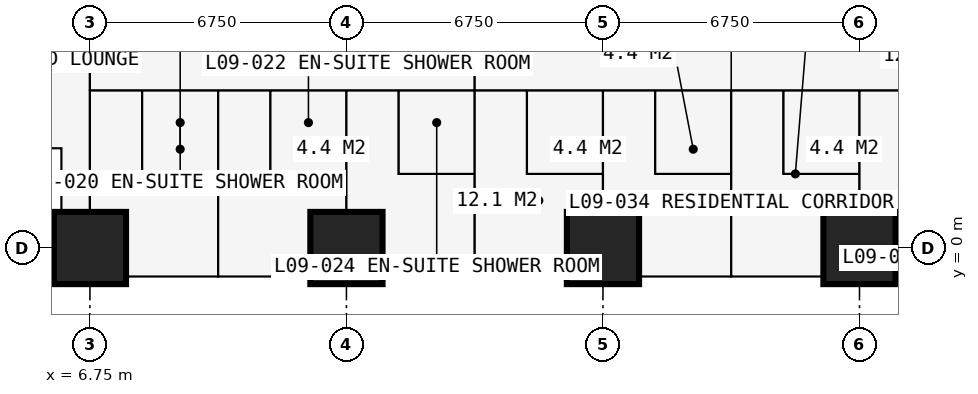
"""IFC4 building model, lengths in metres.
Left out: names, types, materials, properties, quantities, classifications, styles, units other than length and angle.
Written with IfcOpenShell. Run it as: python <this file> out.ifc"""

import sys

from ifc_helpers import new_model, si_unit, direction, frame, frame_2d, origin, origin_2d, place, context, subcontext, project, spatial, rectangle, extrude, element, fill, save


model = new_model("IFC4")
c1 = context("Model", 3, precision=1e-05, world=origin(), true_north=direction((0.0, 1.0)))
c2 = subcontext(c1, "Body", "Model", "MODEL_VIEW")
j1 = project(units=[si_unit("LENGTHUNIT", "METRE"), si_unit("PLANEANGLEUNIT", "RADIAN")], contexts=[c1])
p1 = place(None, origin())
s1 = spatial("IfcSite", under=j1, at=p1, CompositionType="ELEMENT")
p2 = place(p1, origin())
s2 = spatial("IfcBuilding", under=s1, at=p2, CompositionType="ELEMENT")
p3 = place(p2, frame((0.0, 0.0, 36.0)))
s3 = spatial("IfcBuildingStorey", under=s2, at=p3, CompositionType="ELEMENT", Elevation=36.0)
for number, where, z_axis, x_axis in (
    (1, (6.75, 0.0, 0.0), (0.0, 0.0, 1.0), (1.0, 0.0, 0.0)),
    (2, (13.5, 0.0, 0.0), (0.0, 0.0, 1.0), (1.0, 0.0, 0.0)),
    (3, (20.25, 0.0, 0.0), (0.0, 0.0, 1.0), (1.0, 0.0, 0.0)),
    (4, (27.0, 0.0, 0.0), (0.0, 0.0, 1.0), (1.0, 0.0, 0.0)),
):
    element("IfcColumn", number, at=place(p3, frame(where, z_axis=z_axis, x_axis=x_axis)), inside=s3, PredefinedType="COLUMN", context=c2, shape_type="SweptSolid", body=[
        extrude(rectangle(XDim=1.9, YDim=1.9, at=origin_2d()), origin(), (0.0, 0.0, 1.0), 3.6),
    ])
p4 = place(p3, frame((2.625, 2.625, 0.0), z_axis=(0.0, 0.0, 1.0), x_axis=(1.0, 0.0, 0.0)))
e5 = element("IfcWall", 5, at=p4, inside=s3, PredefinedType="SOLIDWALL", context=c2, shape_type="SweptSolid", body=[
    extrude(rectangle(XDim=3.375, YDim=0.3, at=frame_2d((1.688, 0.0))), origin(), (0.0, 0.0, 1.0), 3.375),
])
p5 = place(p4, frame((0.788, 0.0, 0.6)))
e6 = element("IfcOpeningElement", 6, at=p5, cuts=e5, PredefinedType="OPENING", context=c2, shape_type="SweptSolid", body=[
    extrude(rectangle(XDim=1.8, YDim=2.1, at=frame_2d((0.9, 1.05))), frame((0.0, 0.16, 0.0), z_axis=(0.0, -1.0, 0.0), x_axis=(1.0, 0.0, 0.0)), (0.0, 0.0, 1.0), 0.32),
])
p6 = place(p3, frame((6.0, 2.625, 0.0), z_axis=(0.0, 0.0, 1.0), x_axis=(0.0, -1.0, 0.0)))
e7 = element("IfcWall", 7, at=p6, inside=s3, PredefinedType="SOLIDWALL", context=c2, shape_type="SweptSolid", body=[
    extrude(rectangle(XDim=3.375, YDim=0.3, at=frame_2d((1.688, 0.0))), origin(), (0.0, 0.0, 1.0), 3.375),
])
p7 = place(p6, frame((0.317, 0.0, 0.9)))
e8 = element("IfcOpeningElement", 8, at=p7, cuts=e7, PredefinedType="OPENING", context=c2, shape_type="SweptSolid", body=[
    extrude(rectangle(XDim=1.2, YDim=1.8, at=frame_2d((0.6, 0.9))), frame((0.0, 0.16, 0.0), z_axis=(0.0, -1.0, 0.0), x_axis=(1.0, 0.0, 0.0)), (0.0, 0.0, 1.0), 0.32),
])
p8 = place(p3, frame((27.0, -0.75, 0.0), z_axis=(0.0, 0.0, 1.0), x_axis=(-1.0, 0.0, 0.0)))
e9 = element("IfcWall", 9, at=p8, inside=s3, PredefinedType="SOLIDWALL", context=c2, shape_type="SweptSolid", body=[
    extrude(rectangle(XDim=6.75, YDim=0.15, at=frame_2d((3.375, 0.0))), origin(), (0.0, 0.0, 1.0), 3.375),
])
p9 = place(p8, frame((0.996, 0.0, 0.0)))
e10 = element("IfcOpeningElement", 10, at=p9, cuts=e9, PredefinedType="OPENING", context=c2, shape_type="SweptSolid", body=[
    extrude(rectangle(XDim=1.0, YDim=2.2, at=frame_2d((0.5, 1.1))), frame((0.0, 0.085, 0.0), z_axis=(0.0, -1.0, 0.0), x_axis=(1.0, 0.0, 0.0)), (0.0, 0.0, 1.0), 0.17),
])
p10 = place(p8, frame((2.042, 0.0, 0.9)))
e11 = element("IfcOpeningElement", 11, at=p10, cuts=e9, PredefinedType="OPENING", context=c2, shape_type="SweptSolid", body=[
    extrude(rectangle(XDim=1.2, YDim=1.8, at=frame_2d((0.6, 0.9))), frame((0.0, 0.085, 0.0), z_axis=(0.0, -1.0, 0.0), x_axis=(1.0, 0.0, 0.0)), (0.0, 0.0, 1.0), 0.17),
])
p11 = place(p8, frame((4.754, 0.0, 0.0)))
e12 = element("IfcOpeningElement", 12, at=p11, cuts=e9, PredefinedType="OPENING", context=c2, shape_type="SweptSolid", body=[
    extrude(rectangle(XDim=1.0, YDim=2.2, at=frame_2d((0.5, 1.1))), frame((0.0, 0.085, 0.0), z_axis=(0.0, -1.0, 0.0), x_axis=(1.0, 0.0, 0.0)), (0.0, 0.0, 1.0), 0.17),
])
p12 = place(p8, frame((3.508, 0.0, 0.9)))
e13 = element("IfcOpeningElement", 13, at=p12, cuts=e9, PredefinedType="OPENING", context=c2, shape_type="SweptSolid", body=[
    extrude(rectangle(XDim=1.2, YDim=1.8, at=frame_2d((0.6, 0.9))), frame((0.0, 0.085, 0.0), z_axis=(0.0, -1.0, 0.0), x_axis=(1.0, 0.0, 0.0)), (0.0, 0.0, 1.0), 0.17),
])
p13 = place(p3, frame((23.625, -0.85, 0.0), z_axis=(0.0, 0.0, 1.0), x_axis=(0.0, -1.0, 0.0)))
e14 = element("IfcWall", 14, at=p13, inside=s3, PredefinedType="USERDEFINED", context=c2, shape_type="SweptSolid", body=[
    extrude(rectangle(XDim=2.2, YDim=1.0, at=frame_2d((1.1, 0.0))), origin(), (0.0, 0.0, 1.0), 0.9),
])
p14 = place(p3, frame((6.75, -0.734, 0.0), z_axis=(0.0, 0.0, 1.0), x_axis=(0.0, 1.0, 0.0)))
e15 = element("IfcWall", 15, at=p14, inside=s3, PredefinedType="PARTITIONING", context=c2, shape_type="SweptSolid", body=[
    extrude(rectangle(XDim=10.859, YDim=0.15, at=frame_2d((5.429, 0.0))), origin(), (0.0, 0.0, 1.0), 2.877),
])
p15 = place(p3, frame((6.75, 4.15, 0.0), z_axis=(0.0, 0.0, 1.0), x_axis=(1.0, 0.0, 0.0)))
e16 = element("IfcWall", 16, at=p15, inside=s3, PredefinedType="PARTITIONING", context=c2, shape_type="SweptSolid", body=[
    extrude(rectangle(XDim=23.625, YDim=0.1, at=frame_2d((11.812, 0.0))), origin(), (0.0, 0.0, 1.0), 3.375),
])
p16 = place(p15, frame((0.2, 0.0, 0.0)))
e17 = element("IfcOpeningElement", 17, at=p16, cuts=e16, PredefinedType="OPENING", context=c2, shape_type="SweptSolid", body=[
    extrude(rectangle(XDim=0.95, YDim=2.2, at=frame_2d((0.475, 1.1))), frame((0.0, 0.06, 0.0), z_axis=(0.0, -1.0, 0.0), x_axis=(1.0, 0.0, 0.0)), (0.0, 0.0, 1.0), 0.12),
])
p17 = place(p15, frame((3.625, 0.0, 0.0)))
e18 = element("IfcOpeningElement", 18, at=p17, cuts=e16, PredefinedType="OPENING", context=c2, shape_type="SweptSolid", body=[
    extrude(rectangle(XDim=0.95, YDim=2.2, at=frame_2d((0.475, 1.1))), frame((0.0, 0.06, 0.0), z_axis=(0.0, -1.0, 0.0), x_axis=(1.0, 0.0, 0.0)), (0.0, 0.0, 1.0), 0.12),
])
p18 = place(p15, frame((7.0, 0.0, 0.0)))
e19 = element("IfcOpeningElement", 19, at=p18, cuts=e16, PredefinedType="OPENING", context=c2, shape_type="SweptSolid", body=[
    extrude(rectangle(XDim=0.95, YDim=2.2, at=frame_2d((0.475, 1.1))), frame((0.0, 0.06, 0.0), z_axis=(0.0, -1.0, 0.0), x_axis=(1.0, 0.0, 0.0)), (0.0, 0.0, 1.0), 0.12),
])
p19 = place(p15, frame((10.325, 0.0, 0.0)))
e20 = element("IfcOpeningElement", 20, at=p19, cuts=e16, PredefinedType="OPENING", context=c2, shape_type="SweptSolid", body=[
    extrude(rectangle(XDim=0.95, YDim=2.2, at=frame_2d((0.475, 1.1))), frame((0.0, 0.06, 0.0), z_axis=(0.0, -1.0, 0.0), x_axis=(1.0, 0.0, 0.0)), (0.0, 0.0, 1.0), 0.12),
])
p20 = place(p15, frame((13.75, 0.0, 0.0)))
e21 = element("IfcOpeningElement", 21, at=p20, cuts=e16, PredefinedType="OPENING", context=c2, shape_type="SweptSolid", body=[
    extrude(rectangle(XDim=0.95, YDim=2.2, at=frame_2d((0.475, 1.1))), frame((0.0, 0.06, 0.0), z_axis=(0.0, -1.0, 0.0), x_axis=(1.0, 0.0, 0.0)), (0.0, 0.0, 1.0), 0.12),
])
p21 = place(p15, frame((17.125, 0.0, 0.0)))
e22 = element("IfcOpeningElement", 22, at=p21, cuts=e16, PredefinedType="OPENING", context=c2, shape_type="SweptSolid", body=[
    extrude(rectangle(XDim=0.95, YDim=2.2, at=frame_2d((0.475, 1.1))), frame((0.0, 0.06, 0.0), z_axis=(0.0, -1.0, 0.0), x_axis=(1.0, 0.0, 0.0)), (0.0, 0.0, 1.0), 0.12),
])
p22 = place(p15, frame((20.5, 0.0, 0.0)))
e23 = element("IfcOpeningElement", 23, at=p22, cuts=e16, PredefinedType="OPENING", context=c2, shape_type="SweptSolid", body=[
    extrude(rectangle(XDim=0.95, YDim=2.2, at=frame_2d((0.475, 1.1))), frame((0.0, 0.06, 0.0), z_axis=(0.0, -1.0, 0.0), x_axis=(1.0, 0.0, 0.0)), (0.0, 0.0, 1.0), 0.12),
])
p23 = place(p3, frame((8.125, 1.95, 0.0), z_axis=(0.0, 0.0, 1.0), x_axis=(0.0, 1.0, 0.0)))
e24 = element("IfcWall", 24, at=p23, inside=s3, PredefinedType="PARTITIONING", context=c2, shape_type="SweptSolid", body=[
    extrude(rectangle(XDim=2.2, YDim=0.1, at=frame_2d((1.1, 0.0))), origin(), (0.0, 0.0, 1.0), 3.375),
])
p24 = place(p23, frame((0.65, 0.0, 0.0)))
e25 = element("IfcOpeningElement", 25, at=p24, cuts=e24, PredefinedType="OPENING", context=c2, shape_type="SweptSolid", body=[
    extrude(rectangle(XDim=0.9, YDim=2.2, at=frame_2d((0.45, 1.1))), frame((0.0, 0.06, 0.0), z_axis=(0.0, -1.0, 0.0), x_axis=(1.0, 0.0, 0.0)), (0.0, 0.0, 1.0), 0.12),
])
p25 = place(p3, frame((8.125, 1.95, 0.0), z_axis=(0.0, 0.0, 1.0), x_axis=(1.0, 0.0, 0.0)))
e26 = element("IfcWall", 26, at=p25, inside=s3, PredefinedType="PARTITIONING", context=c2, shape_type="SweptSolid", body=[
    extrude(rectangle(XDim=2.0, YDim=0.1, at=frame_2d((1.0, 0.0))), origin(), (0.0, 0.0, 1.0), 3.375),
])
p26 = place(p3, frame((10.125, -0.734, 0.0), z_axis=(0.0, 0.0, 1.0), x_axis=(0.0, 1.0, 0.0)))
e27 = element("IfcWall", 27, at=p26, inside=s3, PredefinedType="PARTITIONING", context=c2, shape_type="SweptSolid", body=[
    extrude(rectangle(XDim=4.884, YDim=0.175, at=frame_2d((2.442, 0.0))), origin(), (0.0, 0.0, 1.0), 3.375),
])
p27 = place(p3, frame((11.5, 1.95, 0.0), z_axis=(0.0, 0.0, 1.0), x_axis=(0.0, 1.0, 0.0)))
e28 = element("IfcWall", 28, at=p27, inside=s3, PredefinedType="PARTITIONING", context=c2, shape_type="SweptSolid", body=[
    extrude(rectangle(XDim=2.2, YDim=0.1, at=frame_2d((1.1, 0.0))), origin(), (0.0, 0.0, 1.0), 3.375),
])
p28 = place(p27, frame((0.65, 0.0, 0.0)))
e29 = element("IfcOpeningElement", 29, at=p28, cuts=e28, PredefinedType="OPENING", context=c2, shape_type="SweptSolid", body=[
    extrude(rectangle(XDim=0.9, YDim=2.2, at=frame_2d((0.45, 1.1))), frame((0.0, 0.06, 0.0), z_axis=(0.0, -1.0, 0.0), x_axis=(1.0, 0.0, 0.0)), (0.0, 0.0, 1.0), 0.12),
])
p29 = place(p3, frame((11.5, 1.95, 0.0), z_axis=(0.0, 0.0, 1.0), x_axis=(1.0, 0.0, 0.0)))
e30 = element("IfcWall", 30, at=p29, inside=s3, PredefinedType="PARTITIONING", context=c2, shape_type="SweptSolid", body=[
    extrude(rectangle(XDim=2.0, YDim=0.1, at=frame_2d((1.0, 0.0))), origin(), (0.0, 0.0, 1.0), 3.375),
])
p30 = place(p3, frame((13.5, -0.734, 0.0), z_axis=(0.0, 0.0, 1.0), x_axis=(0.0, 1.0, 0.0)))
e31 = element("IfcWall", 31, at=p30, inside=s3, PredefinedType="PARTITIONING", context=c2, shape_type="SweptSolid", body=[
    extrude(rectangle(XDim=4.884, YDim=0.175, at=frame_2d((2.442, 0.0))), origin(), (0.0, 0.0, 1.0), 2.61),
])
p31 = place(p3, frame((14.875, 1.95, 0.0), z_axis=(0.0, 0.0, 1.0), x_axis=(0.0, 1.0, 0.0)))
e32 = element("IfcWall", 32, at=p31, inside=s3, PredefinedType="PARTITIONING", context=c2, shape_type="SweptSolid", body=[
    extrude(rectangle(XDim=2.2, YDim=0.1, at=frame_2d((1.1, 0.0))), origin(), (0.0, 0.0, 1.0), 3.375),
])
p32 = place(p31, frame((0.65, 0.0, 0.0)))
e33 = element("IfcOpeningElement", 33, at=p32, cuts=e32, PredefinedType="OPENING", context=c2, shape_type="SweptSolid", body=[
    extrude(rectangle(XDim=0.9, YDim=2.2, at=frame_2d((0.45, 1.1))), frame((0.0, 0.06, 0.0), z_axis=(0.0, -1.0, 0.0), x_axis=(1.0, 0.0, 0.0)), (0.0, 0.0, 1.0), 0.12),
])
p33 = place(p3, frame((14.875, 1.95, 0.0), z_axis=(0.0, 0.0, 1.0), x_axis=(1.0, 0.0, 0.0)))
e34 = element("IfcWall", 34, at=p33, inside=s3, PredefinedType="PARTITIONING", context=c2, shape_type="SweptSolid", body=[
    extrude(rectangle(XDim=2.0, YDim=0.1, at=frame_2d((1.0, 0.0))), origin(), (0.0, 0.0, 1.0), 3.375),
])
p34 = place(p3, frame((16.875, -0.734, 0.0), z_axis=(0.0, 0.0, 1.0), x_axis=(0.0, 1.0, 0.0)))
e35 = element("IfcWall", 35, at=p34, inside=s3, PredefinedType="PARTITIONING", context=c2, shape_type="SweptSolid", body=[
    extrude(rectangle(XDim=12.034, YDim=0.15, at=frame_2d((6.017, 0.0))), origin(), (0.0, 0.0, 1.0), 3.375),
])
p35 = place(p3, frame((18.25, 1.95, 0.0), z_axis=(0.0, 0.0, 1.0), x_axis=(0.0, 1.0, 0.0)))
e36 = element("IfcWall", 36, at=p35, inside=s3, PredefinedType="PARTITIONING", context=c2, shape_type="SweptSolid", body=[
    extrude(rectangle(XDim=2.2, YDim=0.1, at=frame_2d((1.1, 0.0))), origin(), (0.0, 0.0, 1.0), 3.375),
])
p36 = place(p35, frame((0.65, 0.0, 0.0)))
e37 = element("IfcOpeningElement", 37, at=p36, cuts=e36, PredefinedType="OPENING", context=c2, shape_type="SweptSolid", body=[
    extrude(rectangle(XDim=0.9, YDim=2.2, at=frame_2d((0.45, 1.1))), frame((0.0, 0.06, 0.0), z_axis=(0.0, -1.0, 0.0), x_axis=(1.0, 0.0, 0.0)), (0.0, 0.0, 1.0), 0.12),
])
p37 = place(p3, frame((18.25, 1.95, 0.0), z_axis=(0.0, 0.0, 1.0), x_axis=(1.0, 0.0, 0.0)))
e38 = element("IfcWall", 38, at=p37, inside=s3, PredefinedType="PARTITIONING", context=c2, shape_type="SweptSolid", body=[
    extrude(rectangle(XDim=2.0, YDim=0.1, at=frame_2d((1.0, 0.0))), origin(), (0.0, 0.0, 1.0), 3.375),
])
p38 = place(p3, frame((20.25, -0.734, 0.0), z_axis=(0.0, 0.0, 1.0), x_axis=(0.0, 1.0, 0.0)))
e39 = element("IfcWall", 39, at=p38, inside=s3, PredefinedType="PARTITIONING", context=c2, shape_type="SweptSolid", body=[
    extrude(rectangle(XDim=4.884, YDim=0.175, at=frame_2d((2.442, 0.0))), origin(), (0.0, 0.0, 1.0), 2.61),
])
p39 = place(p3, frame((21.625, 1.95, 0.0), z_axis=(0.0, 0.0, 1.0), x_axis=(0.0, 1.0, 0.0)))
e40 = element("IfcWall", 40, at=p39, inside=s3, PredefinedType="PARTITIONING", context=c2, shape_type="SweptSolid", body=[
    extrude(rectangle(XDim=2.2, YDim=0.1, at=frame_2d((1.1, 0.0))), origin(), (0.0, 0.0, 1.0), 3.375),
])
p40 = place(p39, frame((0.65, 0.0, 0.0)))
e41 = element("IfcOpeningElement", 41, at=p40, cuts=e40, PredefinedType="OPENING", context=c2, shape_type="SweptSolid", body=[
    extrude(rectangle(XDim=0.9, YDim=2.2, at=frame_2d((0.45, 1.1))), frame((0.0, 0.06, 0.0), z_axis=(0.0, -1.0, 0.0), x_axis=(1.0, 0.0, 0.0)), (0.0, 0.0, 1.0), 0.12),
])
p41 = place(p3, frame((21.625, 1.95, 0.0), z_axis=(0.0, 0.0, 1.0), x_axis=(1.0, 0.0, 0.0)))
e42 = element("IfcWall", 42, at=p41, inside=s3, PredefinedType="PARTITIONING", context=c2, shape_type="SweptSolid", body=[
    extrude(rectangle(XDim=2.0, YDim=0.1, at=frame_2d((1.0, 0.0))), origin(), (0.0, 0.0, 1.0), 3.375),
])
p42 = place(p3, frame((23.625, -0.734, 0.0), z_axis=(0.0, 0.0, 1.0), x_axis=(0.0, 1.0, 0.0)))
e43 = element("IfcWall", 43, at=p42, inside=s3, PredefinedType="PARTITIONING", context=c2, shape_type="SweptSolid", body=[
    extrude(rectangle(XDim=4.884, YDim=0.175, at=frame_2d((2.442, 0.0))), origin(), (0.0, 0.0, 1.0), 3.375),
])
p43 = place(p3, frame((25.0, 1.95, 0.0), z_axis=(0.0, 0.0, 1.0), x_axis=(0.0, 1.0, 0.0)))
e44 = element("IfcWall", 44, at=p43, inside=s3, PredefinedType="PARTITIONING", context=c2, shape_type="SweptSolid", body=[
    extrude(rectangle(XDim=2.2, YDim=0.1, at=frame_2d((1.1, 0.0))), origin(), (0.0, 0.0, 1.0), 3.375),
])
p44 = place(p43, frame((0.65, 0.0, 0.0)))
e45 = element("IfcOpeningElement", 45, at=p44, cuts=e44, PredefinedType="OPENING", context=c2, shape_type="SweptSolid", body=[
    extrude(rectangle(XDim=0.9, YDim=2.2, at=frame_2d((0.45, 1.1))), frame((0.0, 0.06, 0.0), z_axis=(0.0, -1.0, 0.0), x_axis=(1.0, 0.0, 0.0)), (0.0, 0.0, 1.0), 0.12),
])
p45 = place(p3, frame((25.0, 1.95, 0.0), z_axis=(0.0, 0.0, 1.0), x_axis=(1.0, 0.0, 0.0)))
e46 = element("IfcWall", 46, at=p45, inside=s3, PredefinedType="PARTITIONING", context=c2, shape_type="SweptSolid", body=[
    extrude(rectangle(XDim=2.0, YDim=0.1, at=frame_2d((1.0, 0.0))), origin(), (0.0, 0.0, 1.0), 3.375),
])
p46 = place(p3, frame((27.0, -0.734, 0.0), z_axis=(0.0, 0.0, 1.0), x_axis=(0.0, 1.0, 0.0)))
e47 = element("IfcWall", 47, at=p46, inside=s3, PredefinedType="PARTITIONING", context=c2, shape_type="SweptSolid", body=[
    extrude(rectangle(XDim=4.884, YDim=0.175, at=frame_2d((2.442, 0.0))), origin(), (0.0, 0.0, 1.0), 2.877),
])
p47 = place(p7, origin())
e48 = element("IfcWindow", 48, at=p47, inside=s3, PartitioningType="SINGLE_PANEL", PredefinedType="WINDOW", context=c2, shape_type="SweptSolid", body=[
    extrude(rectangle(XDim=1.2, YDim=1.8, at=frame_2d((0.6, 0.9))), frame((0.0, 0.03, 0.0), z_axis=(0.0, -1.0, 0.0), x_axis=(1.0, 0.0, 0.0)), (0.0, 0.0, 1.0), 0.06),
])
fill(e8, e48)
p48 = place(p9, origin())
e49 = element("IfcDoor", 49, at=p48, inside=s3, OperationType="SINGLE_SWING_LEFT", PredefinedType="DOOR", context=c2, shape_type="SweptSolid", body=[
    extrude(rectangle(XDim=1.0, YDim=2.2, at=frame_2d((0.5, 1.1))), frame((0.0, 0.025, 0.0), z_axis=(0.0, -1.0, 0.0), x_axis=(1.0, 0.0, 0.0)), (0.0, 0.0, 1.0), 0.05),
])
fill(e10, e49)
p49 = place(p10, origin())
e50 = element("IfcWindow", 50, at=p49, inside=s3, PartitioningType="SINGLE_PANEL", PredefinedType="WINDOW", context=c2, shape_type="SweptSolid", body=[
    extrude(rectangle(XDim=1.2, YDim=1.8, at=frame_2d((0.6, 0.9))), frame((0.0, 0.03, 0.0), z_axis=(0.0, -1.0, 0.0), x_axis=(1.0, 0.0, 0.0)), (0.0, 0.0, 1.0), 0.06),
])
fill(e11, e50)
p50 = place(p11, origin())
e51 = element("IfcDoor", 51, at=p50, inside=s3, OperationType="SINGLE_SWING_RIGHT", PredefinedType="DOOR", context=c2, shape_type="SweptSolid", body=[
    extrude(rectangle(XDim=1.0, YDim=2.2, at=frame_2d((0.5, 1.1))), frame((0.0, 0.025, 0.0), z_axis=(0.0, -1.0, 0.0), x_axis=(1.0, 0.0, 0.0)), (0.0, 0.0, 1.0), 0.05),
])
fill(e12, e51)
p51 = place(p12, origin())
e52 = element("IfcWindow", 52, at=p51, inside=s3, PartitioningType="SINGLE_PANEL", PredefinedType="WINDOW", context=c2, shape_type="SweptSolid", body=[
    extrude(rectangle(XDim=1.2, YDim=1.8, at=frame_2d((0.6, 0.9))), frame((0.0, 0.03, 0.0), z_axis=(0.0, -1.0, 0.0), x_axis=(1.0, 0.0, 0.0)), (0.0, 0.0, 1.0), 0.06),
])
fill(e13, e52)
p52 = place(p16, origin())
e53 = element("IfcDoor", 53, at=p52, inside=s3, OperationType="SINGLE_SWING_LEFT", PredefinedType="DOOR", context=c2, shape_type="SweptSolid", body=[
    extrude(rectangle(XDim=0.95, YDim=2.2, at=frame_2d((0.475, 1.1))), frame((0.0, 0.025, 0.0), z_axis=(0.0, -1.0, 0.0), x_axis=(1.0, 0.0, 0.0)), (0.0, 0.0, 1.0), 0.05),
])
fill(e17, e53)
p53 = place(p24, origin())
e54 = element("IfcDoor", 54, at=p53, inside=s3, OperationType="SINGLE_SWING_RIGHT", PredefinedType="DOOR", context=c2, shape_type="SweptSolid", body=[
    extrude(rectangle(XDim=0.9, YDim=2.2, at=frame_2d((0.45, 1.1))), frame((0.0, 0.025, 0.0), z_axis=(0.0, -1.0, 0.0), x_axis=(1.0, 0.0, 0.0)), (0.0, 0.0, 1.0), 0.05),
])
fill(e25, e54)
p54 = place(p17, origin())
e55 = element("IfcDoor", 55, at=p54, inside=s3, OperationType="SINGLE_SWING_LEFT", PredefinedType="DOOR", context=c2, shape_type="SweptSolid", body=[
    extrude(rectangle(XDim=0.95, YDim=2.2, at=frame_2d((0.475, 1.1))), frame((0.0, 0.025, 0.0), z_axis=(0.0, -1.0, 0.0), x_axis=(1.0, 0.0, 0.0)), (0.0, 0.0, 1.0), 0.05),
])
fill(e18, e55)
p55 = place(p28, origin())
e56 = element("IfcDoor", 56, at=p55, inside=s3, OperationType="SINGLE_SWING_RIGHT", PredefinedType="DOOR", context=c2, shape_type="SweptSolid", body=[
    extrude(rectangle(XDim=0.9, YDim=2.2, at=frame_2d((0.45, 1.1))), frame((0.0, 0.025, 0.0), z_axis=(0.0, -1.0, 0.0), x_axis=(1.0, 0.0, 0.0)), (0.0, 0.0, 1.0), 0.05),
])
fill(e29, e56)
p56 = place(p18, origin())
e57 = element("IfcDoor", 57, at=p56, inside=s3, OperationType="SINGLE_SWING_LEFT", PredefinedType="DOOR", context=c2, shape_type="SweptSolid", body=[
    extrude(rectangle(XDim=0.95, YDim=2.2, at=frame_2d((0.475, 1.1))), frame((0.0, 0.025, 0.0), z_axis=(0.0, -1.0, 0.0), x_axis=(1.0, 0.0, 0.0)), (0.0, 0.0, 1.0), 0.05),
])
fill(e19, e57)
p57 = place(p32, origin())
e58 = element("IfcDoor", 58, at=p57, inside=s3, OperationType="SINGLE_SWING_RIGHT", PredefinedType="DOOR", context=c2, shape_type="SweptSolid", body=[
    extrude(rectangle(XDim=0.9, YDim=2.2, at=frame_2d((0.45, 1.1))), frame((0.0, 0.025, 0.0), z_axis=(0.0, -1.0, 0.0), x_axis=(1.0, 0.0, 0.0)), (0.0, 0.0, 1.0), 0.05),
])
fill(e33, e58)
p58 = place(p19, origin())
e59 = element("IfcDoor", 59, at=p58, inside=s3, OperationType="SINGLE_SWING_LEFT", PredefinedType="DOOR", context=c2, shape_type="SweptSolid", body=[
    extrude(rectangle(XDim=0.95, YDim=2.2, at=frame_2d((0.475, 1.1))), frame((0.0, 0.025, 0.0), z_axis=(0.0, -1.0, 0.0), x_axis=(1.0, 0.0, 0.0)), (0.0, 0.0, 1.0), 0.05),
])
fill(e20, e59)
p59 = place(p36, origin())
e60 = element("IfcDoor", 60, at=p59, inside=s3, OperationType="SINGLE_SWING_RIGHT", PredefinedType="DOOR", context=c2, shape_type="SweptSolid", body=[
    extrude(rectangle(XDim=0.9, YDim=2.2, at=frame_2d((0.45, 1.1))), frame((0.0, 0.025, 0.0), z_axis=(0.0, -1.0, 0.0), x_axis=(1.0, 0.0, 0.0)), (0.0, 0.0, 1.0), 0.05),
])
fill(e37, e60)
p60 = place(p20, origin())
e61 = element("IfcDoor", 61, at=p60, inside=s3, OperationType="SINGLE_SWING_LEFT", PredefinedType="DOOR", context=c2, shape_type="SweptSolid", body=[
    extrude(rectangle(XDim=0.95, YDim=2.2, at=frame_2d((0.475, 1.1))), frame((0.0, 0.025, 0.0), z_axis=(0.0, -1.0, 0.0), x_axis=(1.0, 0.0, 0.0)), (0.0, 0.0, 1.0), 0.05),
])
fill(e21, e61)
p61 = place(p40, origin())
e62 = element("IfcDoor", 62, at=p61, inside=s3, OperationType="SINGLE_SWING_RIGHT", PredefinedType="DOOR", context=c2, shape_type="SweptSolid", body=[
    extrude(rectangle(XDim=0.9, YDim=2.2, at=frame_2d((0.45, 1.1))), frame((0.0, 0.025, 0.0), z_axis=(0.0, -1.0, 0.0), x_axis=(1.0, 0.0, 0.0)), (0.0, 0.0, 1.0), 0.05),
])
fill(e41, e62)
p62 = place(p21, origin())
e63 = element("IfcDoor", 63, at=p62, inside=s3, OperationType="SINGLE_SWING_LEFT", PredefinedType="DOOR", context=c2, shape_type="SweptSolid", body=[
    extrude(rectangle(XDim=0.95, YDim=2.2, at=frame_2d((0.475, 1.1))), frame((0.0, 0.025, 0.0), z_axis=(0.0, -1.0, 0.0), x_axis=(1.0, 0.0, 0.0)), (0.0, 0.0, 1.0), 0.05),
])
fill(e22, e63)
p63 = place(p44, origin())
e64 = element("IfcDoor", 64, at=p63, inside=s3, OperationType="SINGLE_SWING_RIGHT", PredefinedType="DOOR", context=c2, shape_type="SweptSolid", body=[
    extrude(rectangle(XDim=0.9, YDim=2.2, at=frame_2d((0.45, 1.1))), frame((0.0, 0.025, 0.0), z_axis=(0.0, -1.0, 0.0), x_axis=(1.0, 0.0, 0.0)), (0.0, 0.0, 1.0), 0.05),
])
fill(e45, e64)
p64 = place(p22, origin())
e65 = element("IfcDoor", 65, at=p64, inside=s3, OperationType="SINGLE_SWING_LEFT", PredefinedType="DOOR", context=c2, shape_type="SweptSolid", body=[
    extrude(rectangle(XDim=0.95, YDim=2.2, at=frame_2d((0.475, 1.1))), frame((0.0, 0.025, 0.0), z_axis=(0.0, -1.0, 0.0), x_axis=(1.0, 0.0, 0.0)), (0.0, 0.0, 1.0), 0.05),
])
fill(e23, e65)
save(model, sys.argv[1])
